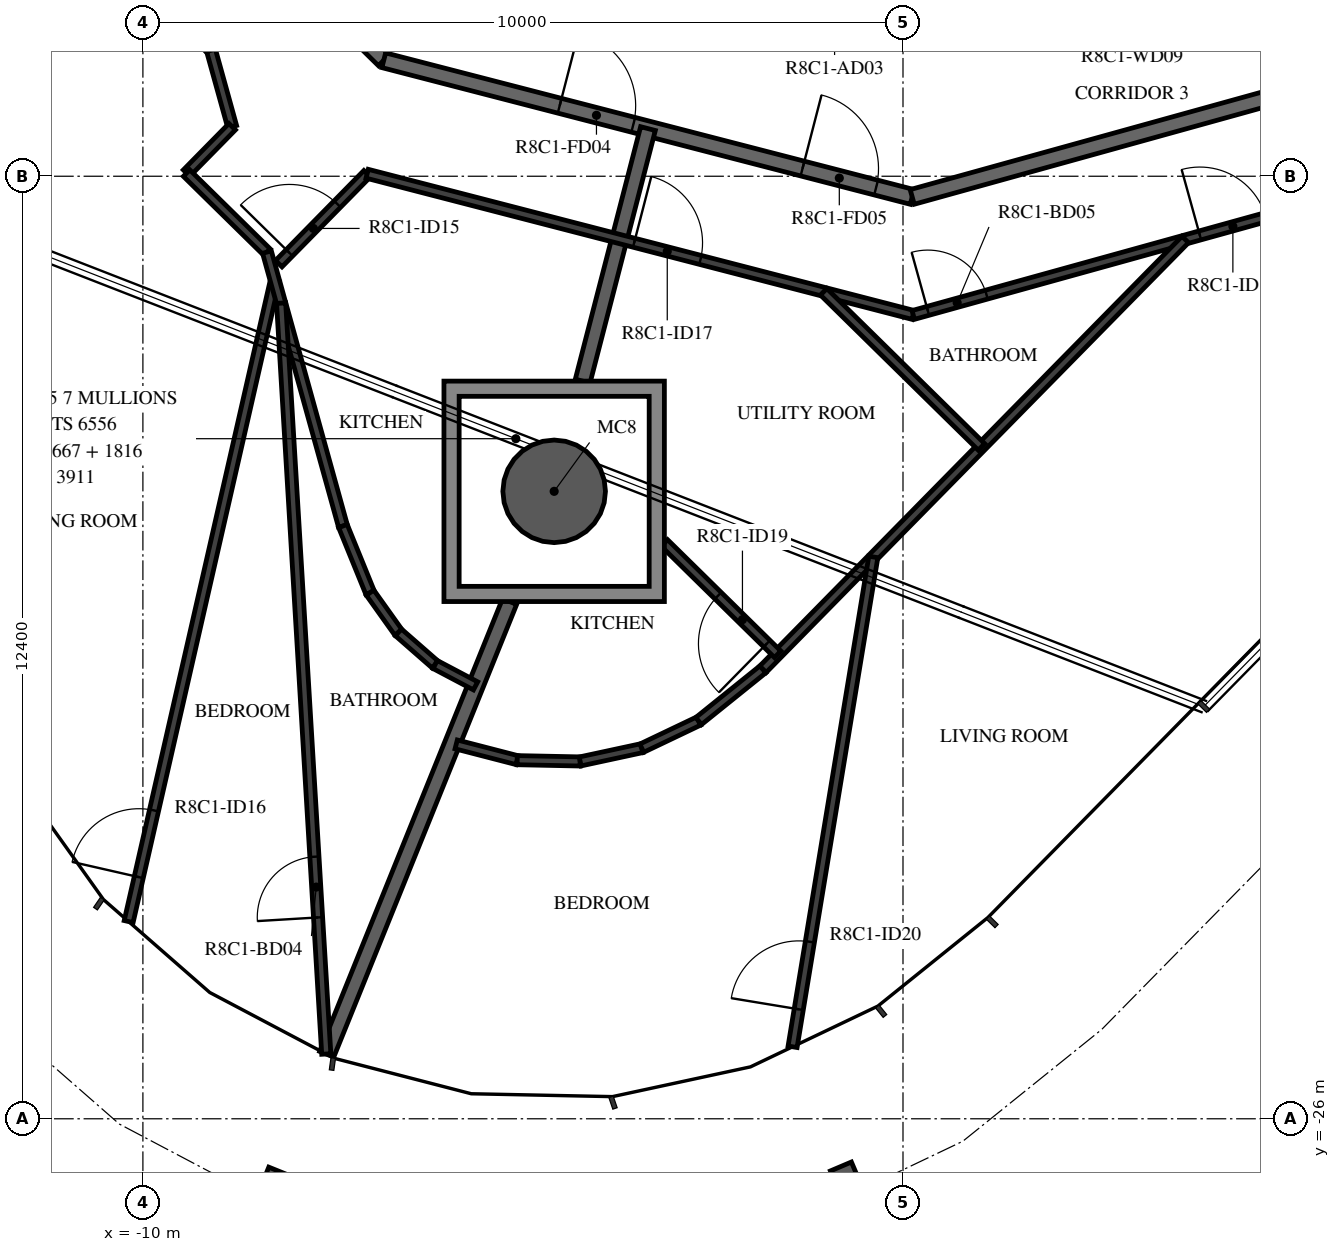
"""IFC4 building model, lengths in metres.
Left out: names, types, materials, properties, quantities, classifications, styles, units other than length and angle.
Written with IfcOpenShell. Run it as: python <this file> out.ifc"""

import sys

from ifc_helpers import new_model, si_unit, direction, frame, frame_2d, origin, origin_2d, place, context, subcontext, project, spatial, polyline, rectangle, hollow_circle, i_section, outline, extrude, element, fill, save


model = new_model("IFC4")
c1 = context("Model", 3, precision=1e-05, world=origin(), true_north=direction((0.0, 1.0)))
c2 = subcontext(c1, "Body", "Model", "MODEL_VIEW")
j1 = project(units=[si_unit("LENGTHUNIT", "METRE"), si_unit("PLANEANGLEUNIT", "RADIAN")], contexts=[c1])
p1 = place(None, origin())
s1 = spatial("IfcSite", under=j1, at=p1, CompositionType="ELEMENT")
p2 = place(p1, origin())
s2 = spatial("IfcBuilding", under=s1, at=p2, CompositionType="ELEMENT")
p3 = place(p2, frame((0.0, 0.0, 322.7)))
s3 = spatial("IfcBuildingStorey", under=s2, at=p3, CompositionType="ELEMENT", Elevation=322.7)
p4 = place(p3, frame((-4.589, -17.745, -0.38), z_axis=(0.0, 0.0, 1.0), x_axis=(1.0, 0.0, 0.0)))
e1 = element("IfcColumn", 1, at=p4, inside=s3, PredefinedType="COLUMN", context=c2, shape_type="SweptSolid", body=[
    extrude(hollow_circle(Radius=0.675, WallThickness=0.03, at=origin_2d()), origin(), (0.0, 0.0, 1.0), 2.616),
])
for number, where, z_axis, x_axis in (
    (2, (-8.373, -27.11, -0.38), (0.0, 0.0, 1.0), (-0.927, 0.375, 0.0)),
    (3, (-0.641, -27.042, -0.38), (0.0, 0.0, 1.0), (-0.92, -0.391, 0.0)),
):
    element("IfcColumn", number, at=place(p3, frame(where, z_axis=z_axis, x_axis=x_axis)), inside=s3, PredefinedType="COLUMN", context=c2, shape_type="SweptSolid", body=[
        extrude(i_section(OverallWidth=0.3, OverallDepth=0.9, WebThickness=0.019, FlangeThickness=0.035, FilletRadius=0.03, at=origin_2d()), origin(), (0.0, 0.0, 1.0), 2.616),
    ])
p5 = place(p3, frame((-11.953, -7.041, 0.0), z_axis=(0.0, 0.0, 1.0), x_axis=(0.713250549143, -0.70090916255, 0.0)))
e4 = element("IfcWall", 4, at=p5, inside=s3, PredefinedType="STANDARD", context=c2, shape_type="SweptSolid", body=[
    extrude(rectangle(XDim=7.181, YDim=0.2, at=frame_2d((3.59, 0.0))), origin(), (0.0, 0.0, 1.0), 3.05),
])
p6 = place(p3, frame((-6.831, -12.074, 0.0), z_axis=(0.0, 0.0, 1.0), x_axis=(0.968144780225, -0.250391063186, 0.0)))
e5 = element("IfcWall", 5, at=p6, inside=s3, PredefinedType="STANDARD", context=c2, shape_type="SweptSolid", body=[
    extrude(rectangle(XDim=7.181, YDim=0.2, at=frame_2d((3.591, 0.0))), origin(), (0.0, 0.0, 1.0), 3.05),
])
p7 = place(p6, frame((2.39, 0.0, 0.0)))
e6 = element("IfcOpeningElement", 6, at=p7, cuts=e5, PredefinedType="OPENING", context=c2, shape_type="SweptSolid", body=[
    extrude(rectangle(XDim=1.0, YDim=2.1, at=frame_2d((0.5, 1.05))), frame((0.0, 0.11, 0.0), z_axis=(0.0, -1.0, 0.0), x_axis=(1.0, 0.0, 0.0)), (0.0, 0.0, 1.0), 0.22),
])
p8 = place(p6, frame((5.69, 0.0, 0.0)))
e7 = element("IfcOpeningElement", 7, at=p8, cuts=e5, PredefinedType="OPENING", context=c2, shape_type="SweptSolid", body=[
    extrude(rectangle(XDim=1.0, YDim=2.1, at=frame_2d((0.5, 1.05))), frame((0.0, 0.11, 0.0), z_axis=(0.0, -1.0, 0.0), x_axis=(1.0, 0.0, 0.0)), (0.0, 0.0, 1.0), 0.22),
])
p9 = place(p3, frame((0.121, -13.872, 0.0), z_axis=(0.0, 0.0, 1.0), x_axis=(0.963625960674, 0.267254575108, 0.0)))
e8 = element("IfcWall", 8, at=p9, inside=s3, PredefinedType="STANDARD", context=c2, shape_type="SweptSolid", body=[
    extrude(rectangle(XDim=7.181, YDim=0.2, at=frame_2d((3.591, 0.0))), origin(), (0.0, 0.0, 1.0), 3.05),
])
p10 = place(p3, frame((-4.214, -16.295, 0.0), z_axis=(0.0, 0.0, 1.0), x_axis=(0.250428810918, 0.968135016752, 0.0)))
e9 = element("IfcWall", 9, at=p10, inside=s3, PredefinedType="STANDARD", context=c2, shape_type="SweptSolid", body=[
    extrude(rectangle(XDim=3.432, YDim=0.2, at=frame_2d((1.716, 0.0))), origin(), (0.0, 0.0, 1.0), 3.05),
])
p11 = place(p3, frame((-7.582, -25.151, 0.0), z_axis=(0.0, 0.0, 1.0), x_axis=(0.374645287615, 0.927168220156, 0.0)))
e10 = element("IfcWall", 10, at=p11, inside=s3, PredefinedType="STANDARD", context=c2, shape_type="SweptSolid", body=[
    extrude(rectangle(XDim=6.423, YDim=0.2, at=frame_2d((3.212, 0.0))), origin(), (0.0, 0.0, 1.0), 3.05),
])
p12 = place(p3, frame((-13.291, -7.829, 0.0), z_axis=(0.0, 0.0, 1.0), x_axis=(0.713255094589, -0.700904537039, 0.0)))
e11 = element("IfcWall", 11, at=p12, inside=s3, PredefinedType="PARTITIONING", context=c2, shape_type="SweptSolid", body=[
    extrude(rectangle(XDim=5.871, YDim=0.12, at=frame_2d((2.936, 0.0))), origin(), (0.0, 0.0, 1.0), 3.05),
])
p13 = place(p12, frame((3.627, 0.0, 0.0)))
e12 = element("IfcOpeningElement", 12, at=p13, cuts=e11, PredefinedType="OPENING", context=c2, shape_type="SweptSolid", body=[
    extrude(rectangle(XDim=0.9, YDim=2.1, at=frame_2d((0.45, 1.05))), frame((0.0, 0.07, 0.0), z_axis=(0.0, -1.0, 0.0), x_axis=(1.0, 0.0, 0.0)), (0.0, 0.0, 1.0), 0.14),
])
p14 = place(p3, frame((-9.104, -11.944, 0.0), z_axis=(0.0, 0.0, 1.0), x_axis=(0.267317596771, -0.963608479859, 0.0)))
e13 = element("IfcWall", 13, at=p14, inside=s3, PredefinedType="PARTITIONING", context=c2, shape_type="SweptSolid", body=[
    extrude(rectangle(XDim=1.042, YDim=0.12, at=frame_2d((0.521, 0.0))), origin(), (0.0, 0.0, 1.0), 3.05),
])
p15 = place(p3, frame((-8.825, -12.948, 0.0), z_axis=(0.0, 0.0, 1.0), x_axis=(-0.700949034431, -0.713211364976, 0.0)))
e14 = element("IfcWall", 14, at=p15, inside=s3, PredefinedType="PARTITIONING", context=c2, shape_type="SweptSolid", body=[
    extrude(rectangle(XDim=0.856, YDim=0.12, at=frame_2d((0.428, 0.0))), origin(), (0.0, 0.0, 1.0), 3.05),
])
p16 = place(p3, frame((-9.425, -13.559, 0.0), z_axis=(0.0, 0.0, 1.0), x_axis=(0.713255540994, -0.700904082768, 0.0)))
e15 = element("IfcWall", 15, at=p16, inside=s3, PredefinedType="PARTITIONING", context=c2, shape_type="SweptSolid", body=[
    extrude(rectangle(XDim=1.482, YDim=0.12, at=frame_2d((0.741, 0.0))), origin(), (0.0, 0.0, 1.0), 3.05),
])
p17 = place(p3, frame((-8.213, -14.75, 0.0), z_axis=(0.0, 0.0, 1.0), x_axis=(0.700899260151, 0.713260280066, 0.0)))
e16 = element("IfcWall", 16, at=p17, inside=s3, PredefinedType="PARTITIONING", context=c2, shape_type="SweptSolid", body=[
    extrude(rectangle(XDim=1.659, YDim=0.12, at=frame_2d((0.83, 0.0))), origin(), (0.0, 0.0, 1.0), 3.05),
])
p18 = place(p17, frame((0.2, 0.0, 0.0)))
e17 = element("IfcOpeningElement", 17, at=p18, cuts=e16, PredefinedType="OPENING", context=c2, shape_type="SweptSolid", body=[
    extrude(rectangle(XDim=0.9, YDim=2.1, at=frame_2d((0.45, 1.05))), frame((0.0, 0.07, 0.0), z_axis=(0.0, -1.0, 0.0), x_axis=(1.0, 0.0, 0.0)), (0.0, 0.0, 1.0), 0.14),
])
p19 = place(p3, frame((-7.05, -13.567, 0.0), z_axis=(0.0, 0.0, 1.0), x_axis=(0.968142373865, -0.250400367264, 0.0)))
e18 = element("IfcWall", 18, at=p19, inside=s3, PredefinedType="PARTITIONING", context=c2, shape_type="SweptSolid", body=[
    extrude(rectangle(XDim=7.421, YDim=0.12, at=frame_2d((3.71, 0.0))), origin(), (0.0, 0.0, 1.0), 3.05),
])
p20 = place(p19, frame((3.628, 0.0, 0.0)))
e19 = element("IfcOpeningElement", 19, at=p20, cuts=e18, PredefinedType="OPENING", context=c2, shape_type="SweptSolid", body=[
    extrude(rectangle(XDim=0.9, YDim=2.1, at=frame_2d((0.45, 1.05))), frame((0.0, 0.07, 0.0), z_axis=(0.0, -1.0, 0.0), x_axis=(1.0, 0.0, 0.0)), (0.0, 0.0, 1.0), 0.14),
])
p21 = place(p3, frame((-14.066, -13.508, 0.0), z_axis=(0.0, 0.0, 1.0), x_axis=(0.700941781432, 0.7132184932, 0.0)))
e20 = element("IfcWall", 20, at=p21, inside=s3, PredefinedType="PARTITIONING", context=c2, shape_type="SweptSolid", body=[
    extrude(rectangle(XDim=4.594, YDim=0.12, at=frame_2d((2.297, 0.0))), origin(), (0.0, 0.0, 1.0), 3.05),
])
p22 = place(p3, frame((-10.187, -23.406, 0.0), z_axis=(0.0, 0.0, 1.0), x_axis=(0.222411648081, 0.974952849526, 0.0)))
e21 = element("IfcWall", 21, at=p22, inside=s3, PredefinedType="PARTITIONING", context=c2, shape_type="SweptSolid", body=[
    extrude(rectangle(XDim=8.649, YDim=0.12, at=frame_2d((4.324, 0.0))), origin(), (0.0, 0.0, 1.0), 3.05),
])
p23 = place(p22, frame((0.6, 0.0, 0.0)))
e22 = element("IfcOpeningElement", 22, at=p23, cuts=e21, PredefinedType="OPENING", context=c2, shape_type="SweptSolid", body=[
    extrude(rectangle(XDim=0.9, YDim=2.1, at=frame_2d((0.45, 1.05))), frame((0.0, 0.07, 0.0), z_axis=(0.0, -1.0, 0.0), x_axis=(1.0, 0.0, 0.0)), (0.0, 0.0, 1.0), 0.14),
])
p24 = place(p3, frame((-7.368, -18.202, 0.0), z_axis=(0.0, 0.0, 1.0), x_axis=(-0.267246564077, 0.963628182438, 0.0)))
e23 = element("IfcWall", 23, at=p24, inside=s3, PredefinedType="PARTITIONING", context=c2, shape_type="SweptSolid", body=[
    extrude(rectangle(XDim=3.74, YDim=0.12, at=frame_2d((1.87, 0.0))), origin(), (0.0, 0.0, 1.0), 3.05),
])
p25 = place(p3, frame((-7.587, -25.148, 0.0), z_axis=(0.0, 0.0, 1.0), x_axis=(-0.060023558623, 0.99819696073, 0.0)))
e24 = element("IfcWall", 24, at=p25, inside=s3, PredefinedType="PARTITIONING", context=c2, shape_type="SweptSolid", body=[
    extrude(rectangle(XDim=9.896, YDim=0.12, at=frame_2d((4.948, 0.0))), origin(), (0.0, 0.0, 1.0), 3.05),
])
p26 = place(p25, frame((1.8, 0.0, 0.0)))
e25 = element("IfcOpeningElement", 25, at=p26, cuts=e24, PredefinedType="OPENING", context=c2, shape_type="SweptSolid", body=[
    extrude(rectangle(XDim=0.8, YDim=2.1, at=frame_2d((0.4, 1.05))), frame((0.0, 0.07, 0.0), z_axis=(0.0, -1.0, 0.0), x_axis=(1.0, 0.0, 0.0)), (0.0, 0.0, 1.0), 0.14),
])
p27 = place(p3, frame((-7.368, -18.202, 0.0), z_axis=(0.0, 0.0, 1.0), x_axis=(0.377296887314, -0.92609235977, 0.0)))
e26 = element("IfcWall", 26, at=p27, inside=s3, PredefinedType="PARTITIONING", context=c2, shape_type="SweptSolid", body=[
    extrude(rectangle(XDim=0.947, YDim=0.12, at=frame_2d((0.473, 0.0))), origin(), (0.0, 0.0, 1.0), 3.05),
])
p28 = place(p3, frame((-7.011, -19.079, 0.0), z_axis=(0.0, 0.0, 1.0), x_axis=(0.580662514246, -0.814144363458, 0.0)))
e27 = element("IfcWall", 27, at=p28, inside=s3, PredefinedType="PARTITIONING", context=c2, shape_type="SweptSolid", body=[
    extrude(rectangle(XDim=0.642, YDim=0.12, at=frame_2d((0.321, 0.0))), origin(), (0.0, 0.0, 1.0), 3.05),
])
p29 = place(p3, frame((-6.638, -19.601, 0.0), z_axis=(0.0, 0.0, 1.0), x_axis=(0.753047703781, -0.657965923001, 0.0)))
e28 = element("IfcWall", 28, at=p29, inside=s3, PredefinedType="PARTITIONING", context=c2, shape_type="SweptSolid", body=[
    extrude(rectangle(XDim=0.642, YDim=0.12, at=frame_2d((0.321, 0.0))), origin(), (0.0, 0.0, 1.0), 3.05),
])
p30 = place(p3, frame((-6.155, -20.024, 0.0), z_axis=(0.0, 0.0, 1.0), x_axis=(0.884133271246, -0.467234800369, 0.0)))
e29 = element("IfcWall", 29, at=p30, inside=s3, PredefinedType="PARTITIONING", context=c2, shape_type="SweptSolid", body=[
    extrude(rectangle(XDim=0.601, YDim=0.12, at=frame_2d((0.301, 0.0))), origin(), (0.0, 0.0, 1.0), 3.05),
])
p31 = place(p3, frame((0.135, -15.425, 0.0), z_axis=(0.0, 0.0, 1.0), x_axis=(0.963633899075, 0.267225950373, 0.0)))
e30 = element("IfcWall", 30, at=p31, inside=s3, PredefinedType="PARTITIONING", context=c2, shape_type="SweptSolid", body=[
    extrude(rectangle(XDim=7.985, YDim=0.12, at=frame_2d((3.992, 0.0))), origin(), (0.0, 0.0, 1.0), 3.05),
])
p32 = place(p31, frame((0.2, 0.0, 0.0)))
e31 = element("IfcOpeningElement", 31, at=p32, cuts=e30, PredefinedType="OPENING", context=c2, shape_type="SweptSolid", body=[
    extrude(rectangle(XDim=0.8, YDim=2.1, at=frame_2d((0.4, 1.05))), frame((0.0, 0.07, 0.0), z_axis=(0.0, -1.0, 0.0), x_axis=(1.0, 0.0, 0.0)), (0.0, 0.0, 1.0), 0.14),
])
p33 = place(p31, frame((3.914, 0.0, 0.0)))
e32 = element("IfcOpeningElement", 32, at=p33, cuts=e30, PredefinedType="OPENING", context=c2, shape_type="SweptSolid", body=[
    extrude(rectangle(XDim=0.9, YDim=2.1, at=frame_2d((0.45, 1.05))), frame((0.0, 0.07, 0.0), z_axis=(0.0, -1.0, 0.0), x_axis=(1.0, 0.0, 0.0)), (0.0, 0.0, 1.0), 0.14),
])
p34 = place(p3, frame((-5.878, -21.075, 0.0), z_axis=(0.0, 0.0, 1.0), x_axis=(0.968171520146, -0.250287649673, 0.0)))
e33 = element("IfcWall", 33, at=p34, inside=s3, PredefinedType="PARTITIONING", context=c2, shape_type="SweptSolid", body=[
    extrude(rectangle(XDim=0.829, YDim=0.12, at=frame_2d((0.415, 0.0))), origin(), (0.0, 0.0, 1.0), 3.05),
])
for number, where, z_axis, x_axis in (
    (34, (-5.076, -21.282, 0.0), (0.0, 0.0, 1.0), (1.0, -0.02, 0.0)),
    (35, (-4.247, -21.299, 0.0), (0.0, 0.0, 1.0), (0.978, 0.211, 0.0)),
):
    element("IfcWall", number, at=place(p3, frame(where, z_axis=z_axis, x_axis=x_axis)), inside=s3, PredefinedType="PARTITIONING", context=c2, shape_type="SweptSolid", body=[
        extrude(rectangle(XDim=0.829, YDim=0.12, at=frame_2d((0.415, 0.0))), origin(), (0.0, 0.0, 1.0), 3.05),
    ])
p35 = place(p3, frame((-3.437, -21.124, 0.0), z_axis=(0.0, 0.0, 1.0), x_axis=(0.902637137035, 0.430402368541, 0.0)))
e36 = element("IfcWall", 36, at=p35, inside=s3, PredefinedType="PARTITIONING", context=c2, shape_type="SweptSolid", body=[
    extrude(rectangle(XDim=0.829, YDim=0.12, at=frame_2d((0.414, 0.0))), origin(), (0.0, 0.0, 1.0), 3.05),
])
p36 = place(p3, frame((-2.689, -20.768, 0.0), z_axis=(0.0, 0.0, 1.0), x_axis=(0.778936756675, 0.627102486919, 0.0)))
e37 = element("IfcWall", 37, at=p36, inside=s3, PredefinedType="PARTITIONING", context=c2, shape_type="SweptSolid", body=[
    extrude(rectangle(XDim=1.087, YDim=0.12, at=frame_2d((0.543, 0.0))), origin(), (0.0, 0.0, 1.0), 3.05),
])
p37 = place(p3, frame((-1.842, -20.086, 0.0), z_axis=(0.0, 0.0, 1.0), x_axis=(0.700919640212, 0.713240252625, 0.0)))
e38 = element("IfcWall", 38, at=p37, inside=s3, PredefinedType="PARTITIONING", context=c2, shape_type="SweptSolid", body=[
    extrude(rectangle(XDim=7.926, YDim=0.12, at=frame_2d((3.963, 0.0))), origin(), (0.0, 0.0, 1.0), 3.05),
])
p38 = place(p3, frame((-1.649, -19.889, 0.0), z_axis=(0.0, 0.0, 1.0), x_axis=(-0.713270858454, 0.700888495041, 0.0)))
e39 = element("IfcWall", 39, at=p38, inside=s3, PredefinedType="PARTITIONING", context=c2, shape_type="SweptSolid", body=[
    extrude(rectangle(XDim=2.09, YDim=0.12, at=frame_2d((1.045, 0.0))), origin(), (0.0, 0.0, 1.0), 3.05),
])
p39 = place(p38, frame((0.2, 0.0, 0.0)))
e40 = element("IfcOpeningElement", 40, at=p39, cuts=e39, PredefinedType="OPENING", context=c2, shape_type="SweptSolid", body=[
    extrude(rectangle(XDim=0.9, YDim=2.1, at=frame_2d((0.45, 1.05))), frame((0.0, 0.07, 0.0), z_axis=(0.0, -1.0, 0.0), x_axis=(1.0, 0.0, 0.0)), (0.0, 0.0, 1.0), 0.14),
])
p40 = place(p3, frame((-1.453, -25.053, 0.0), z_axis=(0.0, 0.0, 1.0), x_axis=(0.162683241952, 0.986678348191, 0.0)))
e41 = element("IfcWall", 41, at=p40, inside=s3, PredefinedType="PARTITIONING", context=c2, shape_type="SweptSolid", body=[
    extrude(rectangle(XDim=6.531, YDim=0.12, at=frame_2d((3.266, 0.0))), origin(), (0.0, 0.0, 1.0), 3.05),
])
p41 = place(p40, frame((0.5, 0.0, 0.0)))
e42 = element("IfcOpeningElement", 42, at=p41, cuts=e41, PredefinedType="OPENING", context=c2, shape_type="SweptSolid", body=[
    extrude(rectangle(XDim=0.9, YDim=2.1, at=frame_2d((0.45, 1.05))), frame((0.0, 0.07, 0.0), z_axis=(0.0, -1.0, 0.0), x_axis=(1.0, 0.0, 0.0)), (0.0, 0.0, 1.0), 0.14),
])
p42 = place(p3, frame((1.032, -17.161, 0.0), z_axis=(0.0, 0.0, 1.0), x_axis=(-0.713201827259, 0.700958738867, 0.0)))
e43 = element("IfcWall", 43, at=p42, inside=s3, PredefinedType="PARTITIONING", context=c2, shape_type="SweptSolid", body=[
    extrude(rectangle(XDim=2.911, YDim=0.12, at=frame_2d((1.456, 0.0))), origin(), (0.0, 0.0, 1.0), 3.05),
])
p43 = place(p3, origin())
e44 = element("IfcWall", 44, at=p43, inside=s3, PredefinedType="STANDARD", context=c2, shape_type="SweptSolid", body=[
    extrude(outline(polyline([(-3.139, -16.295), (-3.139, -19.195), (-6.039, -19.195), (-6.039, -16.295), (-3.139, -16.295)]), holes=[polyline([(-5.839, -18.995), (-3.339, -18.995), (-3.339, -16.495), (-5.839, -16.495), (-5.839, -18.995)])]), origin(), (0.0, 0.0, 1.0), 3.05),
])
p44 = place(p7, origin())
e45 = element("IfcDoor", 45, at=p44, inside=s3, OperationType="SINGLE_SWING_RIGHT", PredefinedType="DOOR", context=c2, shape_type="SweptSolid", body=[
    extrude(rectangle(XDim=1.0, YDim=2.1, at=frame_2d((0.5, 1.05))), frame((0.0, 0.025, 0.0), z_axis=(0.0, -1.0, 0.0), x_axis=(1.0, 0.0, 0.0)), (0.0, 0.0, 1.0), 0.05),
])
fill(e6, e45)
p45 = place(p18, origin())
e46 = element("IfcDoor", 46, at=p45, inside=s3, OperationType="SINGLE_SWING_LEFT", PredefinedType="DOOR", context=c2, shape_type="SweptSolid", body=[
    extrude(rectangle(XDim=0.9, YDim=2.1, at=frame_2d((0.45, 1.05))), frame((0.0, 0.025, 0.0), z_axis=(0.0, -1.0, 0.0), x_axis=(1.0, 0.0, 0.0)), (0.0, 0.0, 1.0), 0.05),
])
fill(e17, e46)
p46 = place(p23, origin())
e47 = element("IfcDoor", 47, at=p46, inside=s3, OperationType="SINGLE_SWING_RIGHT", PredefinedType="DOOR", context=c2, shape_type="SweptSolid", body=[
    extrude(rectangle(XDim=0.9, YDim=2.1, at=frame_2d((0.45, 1.05))), frame((0.0, 0.025, 0.0), z_axis=(0.0, -1.0, 0.0), x_axis=(1.0, 0.0, 0.0)), (0.0, 0.0, 1.0), 0.05),
])
fill(e22, e47)
p47 = place(p26, origin())
e48 = element("IfcDoor", 48, at=p47, inside=s3, OperationType="SINGLE_SWING_RIGHT", PredefinedType="DOOR", context=c2, shape_type="SweptSolid", body=[
    extrude(rectangle(XDim=0.8, YDim=2.1, at=frame_2d((0.4, 1.05))), frame((0.0, 0.025, 0.0), z_axis=(0.0, -1.0, 0.0), x_axis=(1.0, 0.0, 0.0)), (0.0, 0.0, 1.0), 0.05),
])
fill(e25, e48)
p48 = place(p8, origin())
e49 = element("IfcDoor", 49, at=p48, inside=s3, OperationType="SINGLE_SWING_LEFT", PredefinedType="DOOR", context=c2, shape_type="SweptSolid", body=[
    extrude(rectangle(XDim=1.0, YDim=2.1, at=frame_2d((0.5, 1.05))), frame((0.0, 0.025, 0.0), z_axis=(0.0, -1.0, 0.0), x_axis=(1.0, 0.0, 0.0)), (0.0, 0.0, 1.0), 0.05),
])
fill(e7, e49)
p49 = place(p20, origin())
e50 = element("IfcDoor", 50, at=p49, inside=s3, OperationType="SINGLE_SWING_RIGHT", PredefinedType="DOOR", context=c2, shape_type="SweptSolid", body=[
    extrude(rectangle(XDim=0.9, YDim=2.1, at=frame_2d((0.45, 1.05))), frame((0.0, 0.025, 0.0), z_axis=(0.0, -1.0, 0.0), x_axis=(1.0, 0.0, 0.0)), (0.0, 0.0, 1.0), 0.05),
])
fill(e19, e50)
p50 = place(p32, origin())
e51 = element("IfcDoor", 51, at=p50, inside=s3, OperationType="SINGLE_SWING_LEFT", PredefinedType="DOOR", context=c2, shape_type="SweptSolid", body=[
    extrude(rectangle(XDim=0.8, YDim=2.1, at=frame_2d((0.4, 1.05))), frame((0.0, 0.025, 0.0), z_axis=(0.0, -1.0, 0.0), x_axis=(1.0, 0.0, 0.0)), (0.0, 0.0, 1.0), 0.05),
])
fill(e31, e51)
p51 = place(p33, origin())
e52 = element("IfcDoor", 52, at=p51, inside=s3, OperationType="SINGLE_SWING_LEFT", PredefinedType="DOOR", context=c2, shape_type="SweptSolid", body=[
    extrude(rectangle(XDim=0.9, YDim=2.1, at=frame_2d((0.45, 1.05))), frame((0.0, 0.025, 0.0), z_axis=(0.0, -1.0, 0.0), x_axis=(1.0, 0.0, 0.0)), (0.0, 0.0, 1.0), 0.05),
])
fill(e32, e52)
p52 = place(p39, origin())
e53 = element("IfcDoor", 53, at=p52, inside=s3, OperationType="SINGLE_SWING_LEFT", PredefinedType="DOOR", context=c2, shape_type="SweptSolid", body=[
    extrude(rectangle(XDim=0.9, YDim=2.1, at=frame_2d((0.45, 1.05))), frame((0.0, 0.025, 0.0), z_axis=(0.0, -1.0, 0.0), x_axis=(1.0, 0.0, 0.0)), (0.0, 0.0, 1.0), 0.05),
])
fill(e40, e53)
p53 = place(p41, origin())
e54 = element("IfcDoor", 54, at=p53, inside=s3, OperationType="SINGLE_SWING_LEFT", PredefinedType="DOOR", context=c2, shape_type="SweptSolid", body=[
    extrude(rectangle(XDim=0.9, YDim=2.1, at=frame_2d((0.45, 1.05))), frame((0.0, 0.025, 0.0), z_axis=(0.0, -1.0, 0.0), x_axis=(1.0, 0.0, 0.0)), (0.0, 0.0, 1.0), 0.05),
])
fill(e42, e54)
save(model, sys.argv[1])
